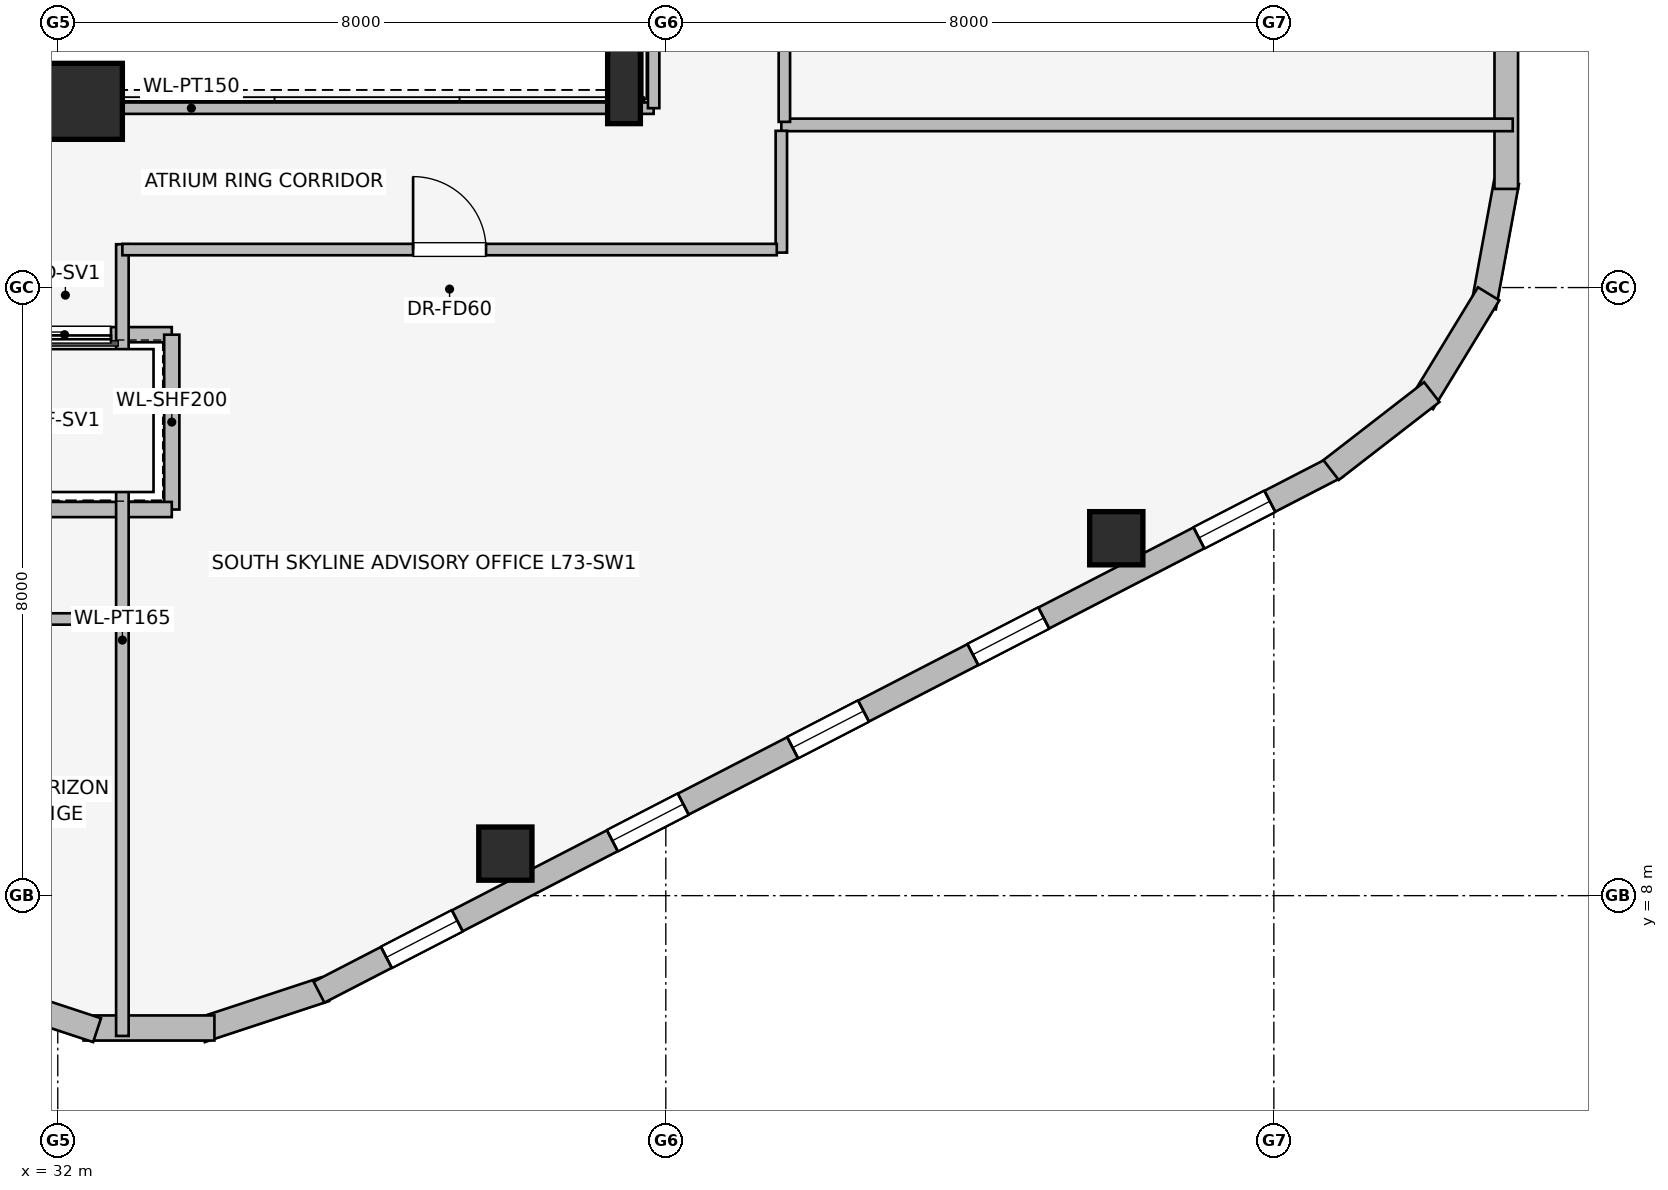
"""IFC4 building model, lengths in metres.
Left out: names, types, materials, properties, quantities, classifications, styles, units other than length and angle.
Written with IfcOpenShell. Run it as: python <this file> out.ifc"""

import sys

from ifc_helpers import new_model, si_unit, direction, frame, frame_2d, origin, origin_2d, place, context, subcontext, project, spatial, rectangle, i_section, extrude, element, fill, save


model = new_model("IFC4")
c1 = context("Model", 3, precision=1e-05, world=origin(), true_north=direction((0.0, 1.0)))
c2 = subcontext(c1, "Body", "Model", "MODEL_VIEW")
j1 = project(units=[si_unit("LENGTHUNIT", "METRE"), si_unit("PLANEANGLEUNIT", "RADIAN")], contexts=[c1])
p1 = place(None, origin())
s1 = spatial("IfcSite", under=j1, at=p1, CompositionType="ELEMENT")
p2 = place(p1, origin())
s2 = spatial("IfcBuilding", under=s1, at=p2, CompositionType="ELEMENT")
p3 = place(p2, frame((0.0, 0.0, 266.75)))
s3 = spatial("IfcBuildingStorey", under=s2, at=p3, CompositionType="ELEMENT", Elevation=266.75)
p4 = place(p3, frame((32.35, 18.45, 0.0), z_axis=(0.0, 0.0, 1.0), x_axis=(1.0, 0.0, 0.0)))
e1 = element("IfcColumn", 1, at=p4, inside=s3, PredefinedType="COLUMN", context=c2, shape_type="SweptSolid", body=[
    extrude(rectangle(XDim=1.0, YDim=1.0, at=origin_2d()), origin(), (0.0, 0.0, 1.0), 3.55),
])
for number, where, z_axis, x_axis in (
    (2, (37.889, 8.553, 0.0), (0.0, 0.0, 1.0), (1.0, 0.0, 0.0)),
    (3, (45.927, 12.702, 0.0), (0.0, 0.0, 1.0), (1.0, 0.0, 0.0)),
):
    element("IfcColumn", number, at=place(p3, frame(where, z_axis=z_axis, x_axis=x_axis)), inside=s3, PredefinedType="COLUMN", context=c2, shape_type="SweptSolid", body=[
        extrude(rectangle(XDim=0.7, YDim=0.7, at=origin_2d()), origin(), (0.0, 0.0, 1.0), 3.55),
    ])
p5 = place(p3, frame((39.45, 18.65, 0.0), z_axis=(0.0, 0.0, 1.0), x_axis=(1.0, 0.0, 0.0)))
e4 = element("IfcColumn", 4, at=p5, inside=s3, PredefinedType="COLUMN", context=c2, shape_type="SweptSolid", body=[
    extrude(i_section(OverallWidth=0.431, OverallDepth=0.987, WebThickness=0.034, FlangeThickness=0.062, at=origin_2d()), origin(), (0.0, 0.0, 1.0), 3.55),
])
p6 = place(p3, frame((35.518, 6.769, 0.0), z_axis=(0.0, 0.0, 1.0), x_axis=(-0.949713440491, -0.313120393699, 0.0)))
e5 = element("IfcWall", 5, at=p6, inside=s3, PredefinedType="STANDARD", context=c2, shape_type="SweptSolid", body=[
    extrude(rectangle(XDim=1.722, YDim=0.33, at=frame_2d((0.861, 0.0))), origin(), (0.0, 0.0, 1.0), 3.24),
])
p7 = place(p3, frame((34.061, 6.259, 0.0), z_axis=(0.0, 0.0, 1.0), x_axis=(-1.0, 0.0, 0.0)))
e6 = element("IfcWall", 6, at=p7, inside=s3, PredefinedType="STANDARD", context=c2, shape_type="SweptSolid", body=[
    extrude(rectangle(XDim=1.722, YDim=0.33, at=frame_2d((0.861, 0.0))), origin(), (0.0, 0.0, 1.0), 3.24),
])
p8 = place(p3, frame((32.517, 6.23, 0.0), z_axis=(0.0, 0.0, 1.0), x_axis=(-0.949713440491, 0.313120393699, 0.0)))
e7 = element("IfcWall", 7, at=p8, inside=s3, PredefinedType="STANDARD", context=c2, shape_type="SweptSolid", body=[
    extrude(rectangle(XDim=1.722, YDim=0.33, at=frame_2d((0.861, 0.0))), origin(), (0.0, 0.0, 1.0), 3.24),
])
p9 = place(p3, frame((48.834, 13.646, 0.0), z_axis=(0.0, 0.0, 1.0), x_axis=(-0.888581481622, -0.458718814218, 0.0)))
e8 = element("IfcWall", 8, at=p9, inside=s3, PredefinedType="STANDARD", context=c2, shape_type="SweptSolid", body=[
    extrude(rectangle(XDim=15.077, YDim=0.31, at=frame_2d((7.539, 0.0))), origin(), (0.0, 0.0, 1.0), 3.24),
])
p10 = place(p9, frame((0.998, 0.0, 0.75)))
e9 = element("IfcOpeningElement", 9, at=p10, cuts=e8, PredefinedType="OPENING", context=c2, shape_type="SweptSolid", body=[
    extrude(rectangle(XDim=1.05, YDim=1.4, at=frame_2d((0.525, 0.7))), frame((0.0, 0.165, 0.0), z_axis=(0.0, -1.0, 0.0), x_axis=(1.0, 0.0, 0.0)), (0.0, 0.0, 1.0), 0.33),
])
p11 = place(p9, frame((4.345, 0.0, 0.75)))
e10 = element("IfcOpeningElement", 10, at=p11, cuts=e8, PredefinedType="OPENING", context=c2, shape_type="SweptSolid", body=[
    extrude(rectangle(XDim=1.05, YDim=1.4, at=frame_2d((0.525, 0.7))), frame((0.0, 0.165, 0.0), z_axis=(0.0, -1.0, 0.0), x_axis=(1.0, 0.0, 0.0)), (0.0, 0.0, 1.0), 0.33),
])
p12 = place(p9, frame((7.014, 0.0, 0.75)))
e11 = element("IfcOpeningElement", 11, at=p12, cuts=e8, PredefinedType="OPENING", context=c2, shape_type="SweptSolid", body=[
    extrude(rectangle(XDim=1.05, YDim=1.4, at=frame_2d((0.525, 0.7))), frame((0.0, 0.165, 0.0), z_axis=(0.0, -1.0, 0.0), x_axis=(1.0, 0.0, 0.0)), (0.0, 0.0, 1.0), 0.33),
])
p13 = place(p9, frame((9.683, 0.0, 0.75)))
e12 = element("IfcOpeningElement", 12, at=p13, cuts=e8, PredefinedType="OPENING", context=c2, shape_type="SweptSolid", body=[
    extrude(rectangle(XDim=1.05, YDim=1.4, at=frame_2d((0.525, 0.7))), frame((0.0, 0.165, 0.0), z_axis=(0.0, -1.0, 0.0), x_axis=(1.0, 0.0, 0.0)), (0.0, 0.0, 1.0), 0.33),
])
p14 = place(p9, frame((13.029, 0.0, 0.75)))
e13 = element("IfcOpeningElement", 13, at=p14, cuts=e8, PredefinedType="OPENING", context=c2, shape_type="SweptSolid", body=[
    extrude(rectangle(XDim=1.05, YDim=1.4, at=frame_2d((0.525, 0.7))), frame((0.0, 0.165, 0.0), z_axis=(0.0, -1.0, 0.0), x_axis=(1.0, 0.0, 0.0)), (0.0, 0.0, 1.0), 0.33),
])
p15 = place(p3, frame((51.062, 17.392, 0.0), z_axis=(0.0, 0.0, 1.0), x_axis=(-0.180691763044, -0.983539773862, 0.0)))
e14 = element("IfcWall", 14, at=p15, inside=s3, PredefinedType="STANDARD", context=c2, shape_type="SweptSolid", body=[
    extrude(rectangle(XDim=1.677, YDim=0.33, at=frame_2d((0.838, 0.0))), origin(), (0.0, 0.0, 1.0), 3.24),
])
p16 = place(p3, frame((50.826, 15.918, 0.0), z_axis=(0.0, 0.0, 1.0), x_axis=(-0.520325409202, -0.853968072318, 0.0)))
e15 = element("IfcWall", 15, at=p16, inside=s3, PredefinedType="STANDARD", context=c2, shape_type="SweptSolid", body=[
    extrude(rectangle(XDim=1.678, YDim=0.33, at=frame_2d((0.839, 0.0))), origin(), (0.0, 0.0, 1.0), 3.24),
])
p17 = place(p3, frame((50.078, 14.625, 0.0), z_axis=(0.0, 0.0, 1.0), x_axis=(-0.790691856293, -0.61221433207, 0.0)))
e16 = element("IfcWall", 16, at=p17, inside=s3, PredefinedType="STANDARD", context=c2, shape_type="SweptSolid", body=[
    extrude(rectangle(XDim=1.676, YDim=0.33, at=frame_2d((0.838, 0.0))), origin(), (0.0, 0.0, 1.0), 3.24),
])
p18 = place(p3, frame((51.058, 30.702, 0.0), z_axis=(0.0, 0.0, 1.0), x_axis=(0.0, -1.0, 0.0)))
e17 = element("IfcWall", 17, at=p18, inside=s3, PredefinedType="STANDARD", context=c2, shape_type="SweptSolid", body=[
    extrude(rectangle(XDim=13.404, YDim=0.31, at=frame_2d((6.702, 0.0))), origin(), (0.0, 0.0, 1.0), 3.24),
])
p19 = place(p18, frame((5.455, 0.0, 0.75)))
e18 = element("IfcOpeningElement", 18, at=p19, cuts=e17, PredefinedType="OPENING", context=c2, shape_type="SweptSolid", body=[
    extrude(rectangle(XDim=2.4, YDim=1.6, at=frame_2d((1.2, 0.8))), frame((0.0, 0.165, 0.0), z_axis=(0.0, -1.0, 0.0), x_axis=(1.0, 0.0, 0.0)), (0.0, 0.0, 1.0), 0.33),
])
p20 = place(p3, frame((33.5, 15.38, 0.0), z_axis=(0.0, 0.0, 1.0), x_axis=(-1.0, 0.0, 0.0)))
e19 = element("IfcWall", 19, at=p20, inside=s3, PredefinedType="PARTITIONING", context=c2, shape_type="SweptSolid", body=[
    extrude(rectangle(XDim=2.82, YDim=0.2, at=frame_2d((1.41, 0.0))), origin(), (0.0, 0.0, 1.0), 3.24),
])
p21 = place(p20, frame((0.8, 0.0, 0.0)))
e20 = element("IfcOpeningElement", 20, at=p21, cuts=e19, PredefinedType="OPENING", context=c2, shape_type="SweptSolid", body=[
    extrude(rectangle(XDim=1.2, YDim=2.2, at=frame_2d((0.6, 1.1))), frame((0.0, 0.11, 0.0), z_axis=(0.0, -1.0, 0.0), x_axis=(1.0, 0.0, 0.0)), (0.0, 0.0, 1.0), 0.22),
])
p22 = place(p3, frame((33.5, 13.08, 0.0), z_axis=(0.0, 0.0, 1.0), x_axis=(0.0, 1.0, 0.0)))
e21 = element("IfcWall", 21, at=p22, inside=s3, PredefinedType="PARTITIONING", context=c2, shape_type="SweptSolid", body=[
    extrude(rectangle(XDim=2.3, YDim=0.2, at=frame_2d((1.15, 0.0))), origin(), (0.0, 0.0, 1.0), 3.24),
])
p23 = place(p3, frame((30.879, 13.08, 0.0), z_axis=(0.0, 0.0, 1.0), x_axis=(1.0, 0.0, 0.0)))
e22 = element("IfcWall", 22, at=p23, inside=s3, PredefinedType="PARTITIONING", context=c2, shape_type="SweptSolid", body=[
    extrude(rectangle(XDim=2.621, YDim=0.2, at=frame_2d((1.311, 0.0))), origin(), (0.0, 0.0, 1.0), 3.24),
])
p24 = place(p3, frame((27.675, 18.36, 0.0), z_axis=(0.0, 0.0, 1.0), x_axis=(1.0, 0.0, 0.0)))
e23 = element("IfcWall", 23, at=p24, inside=s3, PredefinedType="PARTITIONING", context=c2, shape_type="SweptSolid", body=[
    extrude(rectangle(XDim=12.165, YDim=0.15, at=frame_2d((6.083, 0.0))), origin(), (0.0, 0.0, 1.0), 2.381),
])
p25 = place(p3, frame((39.84, 18.36, 0.0), z_axis=(0.0, 0.0, 1.0), x_axis=(0.0, 1.0, 0.0)))
e24 = element("IfcWall", 24, at=p25, inside=s3, PredefinedType="PARTITIONING", context=c2, shape_type="SweptSolid", body=[
    extrude(rectangle(XDim=11.28, YDim=0.15, at=frame_2d((5.64, 0.0))), origin(), (0.0, 0.0, 1.0), 3.24),
])
p26 = place(p3, frame((32.85, 6.154, 0.0), z_axis=(0.0, 0.0, 1.0), x_axis=(0.0, 1.0, 0.0)))
e25 = element("IfcWall", 25, at=p26, inside=s3, PredefinedType="PARTITIONING", context=c2, shape_type="SweptSolid", body=[
    extrude(rectangle(XDim=10.416, YDim=0.165, at=frame_2d((5.208, 0.0))), origin(), (0.0, 0.0, 1.0), 3.24),
])
p27 = place(p3, frame((21.244, 11.64, 0.0), z_axis=(0.0, 0.0, 1.0), x_axis=(1.0, 0.0, 0.0)))
e26 = element("IfcWall", 26, at=p27, inside=s3, PredefinedType="PARTITIONING", context=c2, shape_type="SweptSolid", body=[
    extrude(rectangle(XDim=11.606, YDim=0.15, at=frame_2d((5.803, 0.0))), origin(), (0.0, 0.0, 1.0), 2.783),
])
p28 = place(p27, frame((4.856, 0.0, 0.0)))
e27 = element("IfcOpeningElement", 27, at=p28, cuts=e26, PredefinedType="OPENING", context=c2, shape_type="SweptSolid", body=[
    extrude(rectangle(XDim=0.9, YDim=2.0, at=frame_2d((0.45, 1.0))), frame((0.0, 0.085, 0.0), z_axis=(0.0, -1.0, 0.0), x_axis=(1.0, 0.0, 0.0)), (0.0, 0.0, 1.0), 0.17),
])
p29 = place(p27, frame((8.306, 0.0, 0.0)))
e28 = element("IfcOpeningElement", 28, at=p29, cuts=e26, PredefinedType="OPENING", context=c2, shape_type="SweptSolid", body=[
    extrude(rectangle(XDim=0.9, YDim=2.0, at=frame_2d((0.45, 1.0))), frame((0.0, 0.085, 0.0), z_axis=(0.0, -1.0, 0.0), x_axis=(1.0, 0.0, 0.0)), (0.0, 0.0, 1.0), 0.17),
])
p30 = place(p3, frame((41.52, 18.14, 0.0), z_axis=(0.0, 0.0, 1.0), x_axis=(1.0, 0.0, 0.0)))
e29 = element("IfcWall", 29, at=p30, inside=s3, PredefinedType="PARTITIONING", context=c2, shape_type="SweptSolid", body=[
    extrude(rectangle(XDim=9.623, YDim=0.165, at=frame_2d((4.812, 0.0))), origin(), (0.0, 0.0, 1.0), 3.24),
])
p31 = place(p3, frame((41.56, 18.18, 0.0), z_axis=(0.0, 0.0, 1.0), x_axis=(0.0, 1.0, 0.0)))
e30 = element("IfcWall", 30, at=p31, inside=s3, PredefinedType="PARTITIONING", context=c2, shape_type="SweptSolid", body=[
    extrude(rectangle(XDim=3.102, YDim=0.15, at=frame_2d((1.551, 0.0))), origin(), (0.0, 0.0, 1.0), 3.24),
])
p32 = place(p31, frame((1.071, 0.0, 0.0)))
e31 = element("IfcOpeningElement", 31, at=p32, cuts=e30, PredefinedType="OPENING", context=c2, shape_type="SweptSolid", body=[
    extrude(rectangle(XDim=0.96, YDim=2.0, at=frame_2d((0.48, 1.0))), frame((0.0, 0.085, 0.0), z_axis=(0.0, -1.0, 0.0), x_axis=(1.0, 0.0, 0.0)), (0.0, 0.0, 1.0), 0.17),
])
p33 = place(p3, frame((41.52, 16.46, 0.0), z_axis=(0.0, 0.0, 1.0), x_axis=(0.0, 1.0, 0.0)))
e32 = element("IfcWall", 32, at=p33, inside=s3, PredefinedType="PARTITIONING", context=c2, shape_type="SweptSolid", body=[
    extrude(rectangle(XDim=1.602, YDim=0.15, at=frame_2d((0.801, 0.0))), origin(), (0.0, 0.0, 1.0), 3.24),
])
p34 = place(p3, frame((32.85, 16.5, 0.0), z_axis=(0.0, 0.0, 1.0), x_axis=(1.0, 0.0, 0.0)))
e33 = element("IfcWall", 33, at=p34, inside=s3, PredefinedType="PARTITIONING", context=c2, shape_type="SweptSolid", body=[
    extrude(rectangle(XDim=8.61, YDim=0.15, at=frame_2d((4.305, 0.0))), origin(), (0.0, 0.0, 1.0), 3.24),
])
p35 = place(p34, frame((3.825, 0.0, 0.0)))
e34 = element("IfcOpeningElement", 34, at=p35, cuts=e33, PredefinedType="OPENING", context=c2, shape_type="SweptSolid", body=[
    extrude(rectangle(XDim=0.96, YDim=2.0, at=frame_2d((0.48, 1.0))), frame((0.0, 0.085, 0.0), z_axis=(0.0, -1.0, 0.0), x_axis=(1.0, 0.0, 0.0)), (0.0, 0.0, 1.0), 0.17),
])
p36 = place(p10, origin())
e35 = element("IfcWindow", 35, at=p36, inside=s3, PartitioningType="SINGLE_PANEL", PredefinedType="WINDOW", context=c2, shape_type="SweptSolid", body=[
    extrude(rectangle(XDim=1.05, YDim=1.4, at=frame_2d((0.525, 0.7))), frame((0.0, 0.03, 0.0), z_axis=(0.0, -1.0, 0.0), x_axis=(1.0, 0.0, 0.0)), (0.0, 0.0, 1.0), 0.06),
])
fill(e9, e35)
p37 = place(p11, origin())
e36 = element("IfcWindow", 36, at=p37, inside=s3, PartitioningType="SINGLE_PANEL", PredefinedType="WINDOW", context=c2, shape_type="SweptSolid", body=[
    extrude(rectangle(XDim=1.05, YDim=1.4, at=frame_2d((0.525, 0.7))), frame((0.0, 0.03, 0.0), z_axis=(0.0, -1.0, 0.0), x_axis=(1.0, 0.0, 0.0)), (0.0, 0.0, 1.0), 0.06),
])
fill(e10, e36)
p38 = place(p12, origin())
e37 = element("IfcWindow", 37, at=p38, inside=s3, PartitioningType="SINGLE_PANEL", PredefinedType="WINDOW", context=c2, shape_type="SweptSolid", body=[
    extrude(rectangle(XDim=1.05, YDim=1.4, at=frame_2d((0.525, 0.7))), frame((0.0, 0.03, 0.0), z_axis=(0.0, -1.0, 0.0), x_axis=(1.0, 0.0, 0.0)), (0.0, 0.0, 1.0), 0.06),
])
fill(e11, e37)
p39 = place(p13, origin())
e38 = element("IfcWindow", 38, at=p39, inside=s3, PartitioningType="SINGLE_PANEL", PredefinedType="WINDOW", context=c2, shape_type="SweptSolid", body=[
    extrude(rectangle(XDim=1.05, YDim=1.4, at=frame_2d((0.525, 0.7))), frame((0.0, 0.03, 0.0), z_axis=(0.0, -1.0, 0.0), x_axis=(1.0, 0.0, 0.0)), (0.0, 0.0, 1.0), 0.06),
])
fill(e12, e38)
p40 = place(p14, origin())
e39 = element("IfcWindow", 39, at=p40, inside=s3, PartitioningType="SINGLE_PANEL", PredefinedType="WINDOW", context=c2, shape_type="SweptSolid", body=[
    extrude(rectangle(XDim=1.05, YDim=1.4, at=frame_2d((0.525, 0.7))), frame((0.0, 0.03, 0.0), z_axis=(0.0, -1.0, 0.0), x_axis=(1.0, 0.0, 0.0)), (0.0, 0.0, 1.0), 0.06),
])
fill(e13, e39)
p41 = place(p21, origin())
e40 = element("IfcDoor", 40, at=p41, inside=s3, OperationType="SLIDING_TO_RIGHT", PredefinedType="DOOR", context=c2, shape_type="SweptSolid", body=[
    extrude(rectangle(XDim=1.2, YDim=2.2, at=frame_2d((0.6, 1.1))), frame((0.0, 0.025, 0.0), z_axis=(0.0, -1.0, 0.0), x_axis=(1.0, 0.0, 0.0)), (0.0, 0.0, 1.0), 0.05),
])
fill(e20, e40)
p42 = place(p35, origin())
e41 = element("IfcDoor", 41, at=p42, inside=s3, OperationType="SINGLE_SWING_LEFT", PredefinedType="DOOR", context=c2, shape_type="SweptSolid", body=[
    extrude(rectangle(XDim=0.96, YDim=2.0, at=frame_2d((0.48, 1.0))), frame((0.0, 0.025, 0.0), z_axis=(0.0, -1.0, 0.0), x_axis=(1.0, 0.0, 0.0)), (0.0, 0.0, 1.0), 0.05),
])
fill(e34, e41)
save(model, sys.argv[1])
